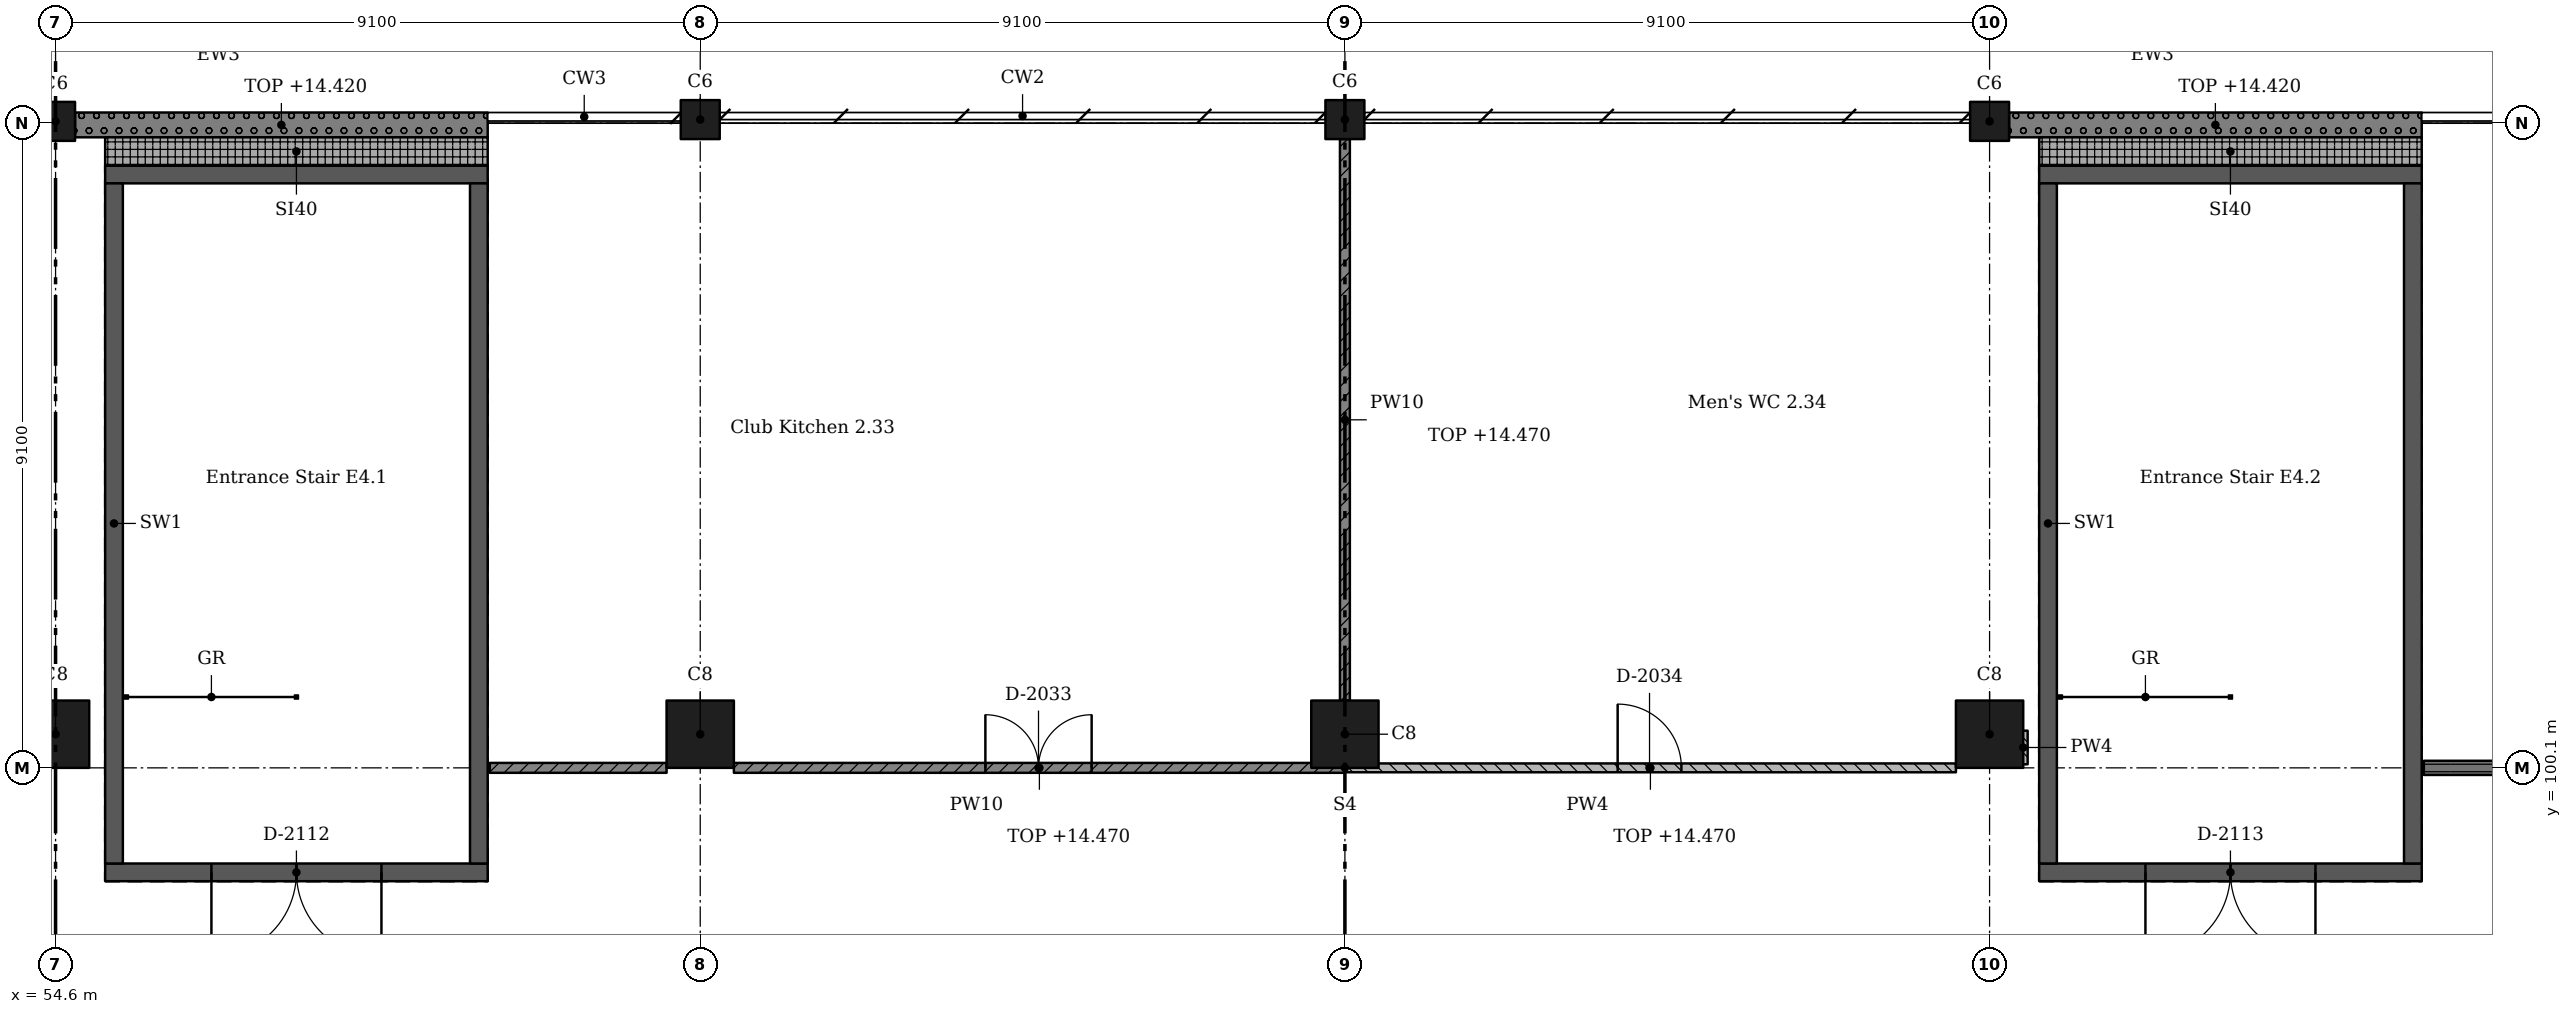
"""IFC4 building model, lengths in metres.
Left out: names, types, materials, properties, quantities, classifications, styles, units other than length and angle.
Written with IfcOpenShell. Run it as: python <this file> out.ifc"""

import sys

from ifc_helpers import new_model, si_unit, direction, frame, frame_2d, origin, origin_2d, place, context, subcontext, project, spatial, rectangle, extrude, element, fill, save


model = new_model("IFC4")
c1 = context("Model", 3, precision=1e-05, world=origin(), true_north=direction((0.0, 1.0)))
c2 = subcontext(c1, "Body", "Model", "MODEL_VIEW")
j1 = project(units=[si_unit("LENGTHUNIT", "METRE"), si_unit("PLANEANGLEUNIT", "RADIAN")], contexts=[c1])
p1 = place(None, origin())
s1 = spatial("IfcSite", under=j1, at=p1, CompositionType="ELEMENT")
p2 = place(p1, origin())
s2 = spatial("IfcBuilding", under=s1, at=p2, CompositionType="ELEMENT")
p3 = place(p2, frame((0.0, 0.0, 10.92)))
s3 = spatial("IfcBuildingStorey", under=s2, at=p3, CompositionType="ELEMENT", Elevation=10.92)
p4 = place(p3, frame((54.6, 100.575, 0.0), z_axis=(0.0, 0.0, 1.0), x_axis=(1.0, 0.0, 0.0)))
e1 = element("IfcColumn", 1, at=p4, inside=s3, PredefinedType="COLUMN", context=c2, shape_type="SweptSolid", body=[
    extrude(rectangle(XDim=0.95, YDim=0.95, at=origin_2d()), origin(), (0.0, 0.0, 1.0), 4.55),
])
p5 = place(p3, frame((54.6, 109.225, 0.0), z_axis=(0.0, 0.0, 1.0), x_axis=(1.0, 0.0, 0.0)))
e2 = element("IfcColumn", 2, at=p5, inside=s3, PredefinedType="COLUMN", context=c2, shape_type="SweptSolid", body=[
    extrude(rectangle(XDim=0.55, YDim=0.55, at=origin_2d()), origin(), (0.0, 0.0, 1.0), 4.55),
])
p6 = place(p3, frame((63.7, 100.575, 0.0), z_axis=(0.0, 0.0, 1.0), x_axis=(1.0, 0.0, 0.0)))
e3 = element("IfcColumn", 3, at=p6, inside=s3, PredefinedType="COLUMN", context=c2, shape_type="SweptSolid", body=[
    extrude(rectangle(XDim=0.95, YDim=0.95, at=origin_2d()), origin(), (0.0, 0.0, 1.0), 4.55),
])
p7 = place(p3, frame((63.7, 109.25, 0.0), z_axis=(0.0, 0.0, 1.0), x_axis=(1.0, 0.0, 0.0)))
e4 = element("IfcColumn", 4, at=p7, inside=s3, PredefinedType="COLUMN", context=c2, shape_type="SweptSolid", body=[
    extrude(rectangle(XDim=0.55, YDim=0.55, at=origin_2d()), origin(), (0.0, 0.0, 1.0), 4.55),
])
p8 = place(p3, frame((72.8, 100.575, 0.0), z_axis=(0.0, 0.0, 1.0), x_axis=(1.0, 0.0, 0.0)))
e5 = element("IfcColumn", 5, at=p8, inside=s3, PredefinedType="COLUMN", context=c2, shape_type="SweptSolid", body=[
    extrude(rectangle(XDim=0.95, YDim=0.95, at=origin_2d()), origin(), (0.0, 0.0, 1.0), 4.55),
])
p9 = place(p3, frame((72.8, 109.25, 0.0), z_axis=(0.0, 0.0, 1.0), x_axis=(1.0, 0.0, 0.0)))
e6 = element("IfcColumn", 6, at=p9, inside=s3, PredefinedType="COLUMN", context=c2, shape_type="SweptSolid", body=[
    extrude(rectangle(XDim=0.55, YDim=0.55, at=origin_2d()), origin(), (0.0, 0.0, 1.0), 4.55),
])
p10 = place(p3, frame((81.9, 100.575, 0.0), z_axis=(0.0, 0.0, 1.0), x_axis=(1.0, 0.0, 0.0)))
e7 = element("IfcColumn", 7, at=p10, inside=s3, PredefinedType="COLUMN", context=c2, shape_type="SweptSolid", body=[
    extrude(rectangle(XDim=0.95, YDim=0.95, at=origin_2d()), origin(), (0.0, 0.0, 1.0), 4.55),
])
p11 = place(p3, frame((81.9, 109.225, 0.0), z_axis=(0.0, 0.0, 1.0), x_axis=(1.0, 0.0, 0.0)))
e8 = element("IfcColumn", 8, at=p11, inside=s3, PredefinedType="COLUMN", context=c2, shape_type="SweptSolid", body=[
    extrude(rectangle(XDim=0.55, YDim=0.55, at=origin_2d()), origin(), (0.0, 0.0, 1.0), 4.55),
])
p12 = place(p3, frame((60.7, 98.625, 0.0), z_axis=(0.0, 0.0, 1.0), x_axis=(-1.0, 0.0, 0.0)))
e9 = element("IfcWall", 9, at=p12, inside=s3, PredefinedType="SHEAR", context=c2, shape_type="SweptSolid", body=[
    extrude(rectangle(XDim=5.4, YDim=0.25, at=frame_2d((2.7, 0.0))), origin(), (0.0, 0.0, 1.0), 4.55),
])
p13 = place(p12, frame((1.5, 0.0, 0.0)))
e10 = element("IfcOpeningElement", 10, at=p13, cuts=e9, PredefinedType="OPENING", context=c2, shape_type="SweptSolid", body=[
    extrude(rectangle(XDim=2.4, YDim=2.1, at=frame_2d((1.2, 1.05))), frame((0.0, 0.135, 0.0), z_axis=(0.0, -1.0, 0.0), x_axis=(1.0, 0.0, 0.0)), (0.0, 0.0, 1.0), 0.27),
])
p14 = place(p3, frame((60.7, 108.475, 0.0), z_axis=(0.0, 0.0, 1.0), x_axis=(-1.0, 0.0, 0.0)))
e11 = element("IfcWall", 11, at=p14, inside=s3, PredefinedType="SHEAR", context=c2, shape_type="SweptSolid", body=[
    extrude(rectangle(XDim=5.4, YDim=0.25, at=frame_2d((2.7, 0.0))), origin(), (0.0, 0.0, 1.0), 4.55),
])
for number, where, z_axis, x_axis in (
    (12, (55.425, 108.35, 0.0), (0.0, 0.0, 1.0), (0.0, -1.0, 0.0)),
    (13, (60.575, 108.35, 0.0), (0.0, 0.0, 1.0), (0.0, -1.0, 0.0)),
):
    element("IfcWall", number, at=place(p3, frame(where, z_axis=z_axis, x_axis=x_axis)), inside=s3, PredefinedType="SHEAR", context=c2, shape_type="SweptSolid", body=[
        extrude(rectangle(XDim=9.6, YDim=0.25, at=frame_2d((4.8, 0.0))), origin(), (0.0, 0.0, 1.0), 4.55),
    ])
p15 = place(p3, frame((88.0, 98.625, 0.0), z_axis=(0.0, 0.0, 1.0), x_axis=(-1.0, 0.0, 0.0)))
e14 = element("IfcWall", 14, at=p15, inside=s3, PredefinedType="SHEAR", context=c2, shape_type="SweptSolid", body=[
    extrude(rectangle(XDim=5.4, YDim=0.25, at=frame_2d((2.7, 0.0))), origin(), (0.0, 0.0, 1.0), 4.55),
])
p16 = place(p15, frame((1.5, 0.0, 0.0)))
e15 = element("IfcOpeningElement", 15, at=p16, cuts=e14, PredefinedType="OPENING", context=c2, shape_type="SweptSolid", body=[
    extrude(rectangle(XDim=2.4, YDim=2.1, at=frame_2d((1.2, 1.05))), frame((0.0, 0.135, 0.0), z_axis=(0.0, -1.0, 0.0), x_axis=(1.0, 0.0, 0.0)), (0.0, 0.0, 1.0), 0.27),
])
p17 = place(p3, frame((88.0, 108.475, 0.0), z_axis=(0.0, 0.0, 1.0), x_axis=(-1.0, 0.0, 0.0)))
e16 = element("IfcWall", 16, at=p17, inside=s3, PredefinedType="SHEAR", context=c2, shape_type="SweptSolid", body=[
    extrude(rectangle(XDim=5.4, YDim=0.25, at=frame_2d((2.7, 0.0))), origin(), (0.0, 0.0, 1.0), 4.55),
])
for number, where, z_axis, x_axis in (
    (17, (82.725, 108.35, 0.0), (0.0, 0.0, 1.0), (0.0, -1.0, 0.0)),
    (18, (87.875, 108.35, 0.0), (0.0, 0.0, 1.0), (0.0, -1.0, 0.0)),
):
    element("IfcWall", number, at=place(p3, frame(where, z_axis=z_axis, x_axis=x_axis)), inside=s3, PredefinedType="SHEAR", context=c2, shape_type="SweptSolid", body=[
        extrude(rectangle(XDim=9.6, YDim=0.25, at=frame_2d((4.8, 0.0))), origin(), (0.0, 0.0, 1.0), 4.55),
    ])
for number, where, z_axis, x_axis in (
    (19, (88.0, 109.175, 0.0), (0.0, 0.0, 1.0), (-1.0, 0.0, 0.0)),
    (20, (60.7, 109.175, 0.0), (0.0, 0.0, 1.0), (-1.0, 0.0, 0.0)),
):
    element("IfcWall", number, at=place(p3, frame(where, z_axis=z_axis, x_axis=x_axis)), inside=s3, PredefinedType="SOLIDWALL", context=c2, shape_type="SweptSolid", body=[
        extrude(rectangle(XDim=5.825, YDim=0.35, at=frame_2d((2.913, 0.0))), origin(), (0.0, 0.0, 1.0), 3.5),
    ])
for number, where, z_axis, x_axis in (
    (21, (55.3, 108.8, 0.0), (0.0, 0.0, 1.0), (1.0, 0.0, 0.0)),
    (22, (82.6, 108.8, 0.0), (0.0, 0.0, 1.0), (1.0, 0.0, 0.0)),
):
    element("IfcWall", number, at=place(p3, frame(where, z_axis=z_axis, x_axis=x_axis)), inside=s3, PredefinedType="SOLIDWALL", context=c2, shape_type="SweptSolid", body=[
        extrude(rectangle(XDim=5.4, YDim=0.4, at=frame_2d((2.7, 0.0))), origin(), (0.0, 0.0, 1.0), 4.25),
    ])
p18 = place(p3, frame((60.73, 100.1, 0.0), z_axis=(0.0, 0.0, 1.0), x_axis=(1.0, 0.0, 0.0)))
e23 = element("IfcWall", 23, at=p18, inside=s3, PredefinedType="SOLIDWALL", context=c2, shape_type="SweptSolid", body=[
    extrude(rectangle(XDim=2.495, YDim=0.14, at=frame_2d((1.248, 0.0))), origin(), (0.0, 0.0, 1.0), 3.55),
])
p19 = place(p3, frame((64.175, 100.1, 0.0), z_axis=(0.0, 0.0, 1.0), x_axis=(1.0, 0.0, 0.0)))
e24 = element("IfcWall", 24, at=p19, inside=s3, PredefinedType="SOLIDWALL", context=c2, shape_type="SweptSolid", body=[
    extrude(rectangle(XDim=8.625, YDim=0.14, at=frame_2d((4.312, 0.0))), origin(), (0.0, 0.0, 1.0), 3.55),
])
p20 = place(p19, frame((3.55, 0.0, 0.0)))
e25 = element("IfcOpeningElement", 25, at=p20, cuts=e24, PredefinedType="OPENING", context=c2, shape_type="SweptSolid", body=[
    extrude(rectangle(XDim=1.5, YDim=2.1, at=frame_2d((0.75, 1.05))), frame((0.0, 0.08, 0.0), z_axis=(0.0, -1.0, 0.0), x_axis=(1.0, 0.0, 0.0)), (0.0, 0.0, 1.0), 0.16),
])
p21 = place(p3, frame((72.8, 100.1, 0.0), z_axis=(0.0, 0.0, 1.0), x_axis=(1.0, 0.0, 0.0)))
e26 = element("IfcWall", 26, at=p21, inside=s3, PredefinedType="PARTITIONING", context=c2, shape_type="SweptSolid", body=[
    extrude(rectangle(XDim=8.625, YDim=0.125, at=frame_2d((4.312, 0.0))), origin(), (0.0, 0.0, 1.0), 3.55),
])
p22 = place(p21, frame((3.85, 0.0, 0.0)))
e27 = element("IfcOpeningElement", 27, at=p22, cuts=e26, PredefinedType="OPENING", context=c2, shape_type="SweptSolid", body=[
    extrude(rectangle(XDim=0.9, YDim=2.1, at=frame_2d((0.45, 1.05))), frame((0.0, 0.073, 0.0), z_axis=(0.0, -1.0, 0.0), x_axis=(1.0, 0.0, 0.0)), (0.0, 0.0, 1.0), 0.145),
])
p23 = place(p3, frame((72.8, 108.975, 0.0), z_axis=(0.0, 0.0, 1.0), x_axis=(0.0, -1.0, 0.0)))
e28 = element("IfcWall", 28, at=p23, inside=s3, PredefinedType="SOLIDWALL", context=c2, shape_type="SweptSolid", body=[
    extrude(rectangle(XDim=7.925, YDim=0.14, at=frame_2d((3.962, 0.0))), origin(), (0.0, 0.0, 1.0), 3.55),
])
p24 = place(p3, frame((82.375, 100.625, 0.0), z_axis=(0.0, 0.0, 1.0), x_axis=(0.0, -1.0, 0.0)))
e29 = element("IfcWall", 29, at=p24, inside=s3, PredefinedType="PARTITIONING", context=c2, shape_type="SweptSolid", body=[
    extrude(rectangle(XDim=0.475, YDim=0.125, at=frame_2d((0.238, 0.0))), origin(), (0.0, 0.0, 1.0), 4.25),
])
p25 = place(p3, frame((88.03, 100.1, 0.0), z_axis=(0.0, 0.0, 1.0), x_axis=(1.0, 0.0, 0.0)))
e30 = element("IfcWall", 30, at=p25, inside=s3, PredefinedType="PARTITIONING", context=c2, shape_type="SweptSolid", body=[
    extrude(rectangle(XDim=2.495, YDim=0.2, at=frame_2d((1.248, 0.0))), origin(), (0.0, 0.0, 1.0), 3.55),
])
p26 = place(p20, origin())
e31 = element("IfcDoor", 31, at=p26, inside=s3, OperationType="DOUBLE_DOOR_SINGLE_SWING", PredefinedType="DOOR", context=c2, shape_type="SweptSolid", body=[
    extrude(rectangle(XDim=1.5, YDim=2.1, at=frame_2d((0.75, 1.05))), frame((0.0, 0.025, 0.0), z_axis=(0.0, -1.0, 0.0), x_axis=(1.0, 0.0, 0.0)), (0.0, 0.0, 1.0), 0.05),
])
fill(e25, e31)
p27 = place(p22, origin())
e32 = element("IfcDoor", 32, at=p27, inside=s3, OperationType="SINGLE_SWING_RIGHT", PredefinedType="DOOR", context=c2, shape_type="SweptSolid", body=[
    extrude(rectangle(XDim=0.9, YDim=2.1, at=frame_2d((0.45, 1.05))), frame((0.0, 0.025, 0.0), z_axis=(0.0, -1.0, 0.0), x_axis=(1.0, 0.0, 0.0)), (0.0, 0.0, 1.0), 0.05),
])
fill(e27, e32)
p28 = place(p13, origin())
e33 = element("IfcDoor", 33, at=p28, inside=s3, OperationType="DOUBLE_DOOR_SINGLE_SWING", PredefinedType="DOOR", context=c2, shape_type="SweptSolid", body=[
    extrude(rectangle(XDim=2.4, YDim=2.1, at=frame_2d((1.2, 1.05))), frame((0.0, 0.025, 0.0), z_axis=(0.0, -1.0, 0.0), x_axis=(1.0, 0.0, 0.0)), (0.0, 0.0, 1.0), 0.05),
])
fill(e10, e33)
p29 = place(p16, origin())
e34 = element("IfcDoor", 34, at=p29, inside=s3, OperationType="DOUBLE_DOOR_SINGLE_SWING", PredefinedType="DOOR", context=c2, shape_type="SweptSolid", body=[
    extrude(rectangle(XDim=2.4, YDim=2.1, at=frame_2d((1.2, 1.05))), frame((0.0, 0.025, 0.0), z_axis=(0.0, -1.0, 0.0), x_axis=(1.0, 0.0, 0.0)), (0.0, 0.0, 1.0), 0.05),
])
fill(e15, e34)
save(model, sys.argv[1])
